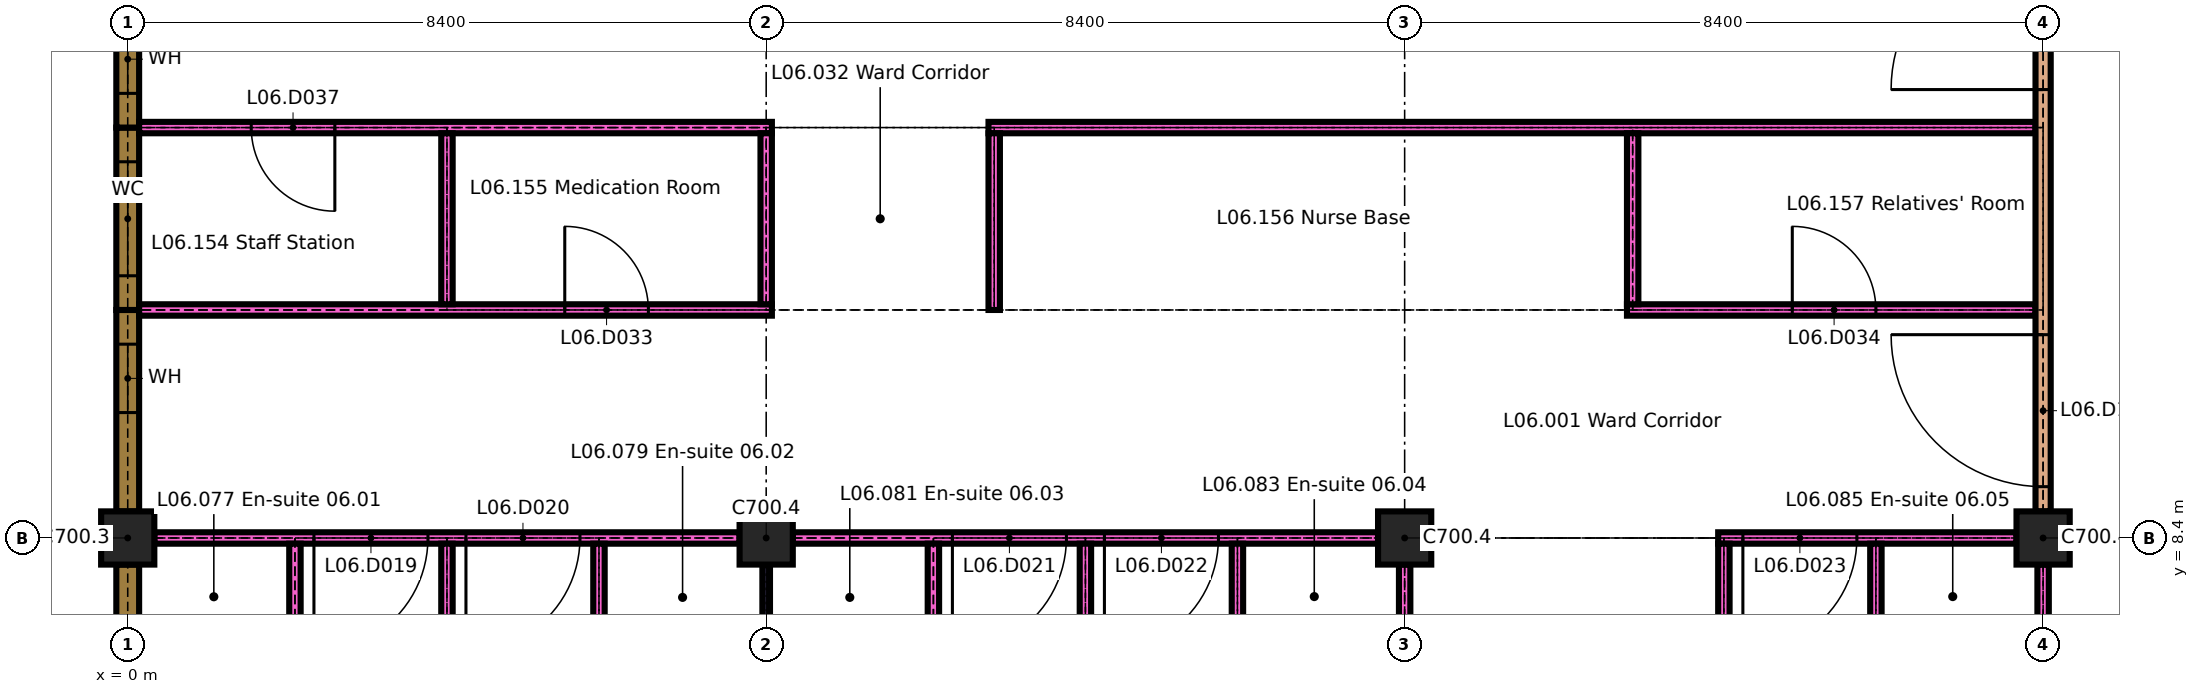
"""IFC4 building model, lengths in metres.
Left out: names, types, materials, properties, quantities, classifications, styles, units other than length and angle.
Written with IfcOpenShell. Run it as: python <this file> out.ifc"""

import sys

from ifc_helpers import new_model, si_unit, direction, frame, frame_2d, origin, origin_2d, place, context, subcontext, project, spatial, rectangle, extrude, element, fill, save


model = new_model("IFC4")
c1 = context("Model", 3, precision=1e-05, world=origin(), true_north=direction((0.0, 1.0)))
c2 = subcontext(c1, "Body", "Model", "MODEL_VIEW")
j1 = project(units=[si_unit("LENGTHUNIT", "METRE"), si_unit("PLANEANGLEUNIT", "RADIAN")], contexts=[c1])
p1 = place(None, origin())
s1 = spatial("IfcSite", under=j1, at=p1, CompositionType="ELEMENT")
p2 = place(p1, origin())
s2 = spatial("IfcBuilding", under=s1, at=p2, CompositionType="ELEMENT")
p3 = place(p2, frame((0.0, 0.0, 26.1)))
s3 = spatial("IfcBuildingStorey", under=s2, at=p3, CompositionType="ELEMENT", Elevation=26.1)
p4 = place(p3, frame((0.0, 8.4, 0.0), z_axis=(0.0, 0.0, 1.0), x_axis=(1.0, 0.0, 0.0)))
e1 = element("IfcColumn", 1, at=p4, inside=s3, PredefinedType="COLUMN", context=c2, shape_type="SweptSolid", body=[
    extrude(rectangle(XDim=0.7, YDim=0.7, at=origin_2d()), origin(), (0.0, 0.0, 1.0), 3.2),
])
for number, where, z_axis, x_axis in (
    (2, (8.4, 8.4, 0.0), (0.0, 0.0, 1.0), (1.0, 0.0, 0.0)),
    (3, (16.8, 8.4, 0.0), (0.0, 0.0, 1.0), (1.0, 0.0, 0.0)),
    (4, (25.2, 8.4, 0.0), (0.0, 0.0, 1.0), (1.0, 0.0, 0.0)),
):
    element("IfcColumn", number, at=place(p3, frame(where, z_axis=z_axis, x_axis=x_axis)), inside=s3, PredefinedType="COLUMN", context=c2, shape_type="SweptSolid", body=[
        extrude(rectangle(XDim=0.7, YDim=0.7, at=origin_2d()), origin(), (0.0, 0.0, 1.0), 3.3),
    ])
p5 = place(p3, frame((0.0, 6.0, 0.0), z_axis=(0.0, 0.0, 1.0), x_axis=(0.0, 1.0, 0.0)))
e5 = element("IfcWall", 5, at=p5, inside=s3, PredefinedType="SOLIDWALL", context=c2, shape_type="SweptSolid", body=[
    extrude(rectangle(XDim=2.05, YDim=0.3, at=frame_2d((1.025, 0.0))), origin(), (0.0, 0.0, 1.0), 2.9),
])
p6 = place(p3, frame((0.0, 8.75, 0.0), z_axis=(0.0, 0.0, 1.0), x_axis=(0.0, 1.0, 0.0)))
e6 = element("IfcWall", 6, at=p6, inside=s3, PredefinedType="SOLIDWALL", context=c2, shape_type="SweptSolid", body=[
    extrude(rectangle(XDim=2.65, YDim=0.3, at=frame_2d((1.325, 0.0))), origin(), (0.0, 0.0, 1.0), 2.9),
])
p7 = place(p6, frame((1.3, 0.0, 0.9)))
e7 = element("IfcOpeningElement", 7, at=p7, cuts=e6, PredefinedType="OPENING", context=c2, shape_type="SweptSolid", body=[
    extrude(rectangle(XDim=0.9, YDim=1.5, at=frame_2d((0.45, 0.75))), frame((0.0, 0.16, 0.0), z_axis=(0.0, -1.0, 0.0), x_axis=(1.0, 0.0, 0.0)), (0.0, 0.0, 1.0), 0.32),
])
p8 = place(p3, frame((0.0, 11.4, 0.0), z_axis=(0.0, 0.0, 1.0), x_axis=(0.0, 1.0, 0.0)))
e8 = element("IfcWall", 8, at=p8, inside=s3, PredefinedType="SOLIDWALL", context=c2, shape_type="SweptSolid", body=[
    extrude(rectangle(XDim=2.4, YDim=0.3, at=frame_2d((1.2, 0.0))), origin(), (0.0, 0.0, 1.0), 2.9),
])
p9 = place(p8, frame((0.45, 0.0, 0.9)))
e9 = element("IfcOpeningElement", 9, at=p9, cuts=e8, PredefinedType="OPENING", context=c2, shape_type="SweptSolid", body=[
    extrude(rectangle(XDim=1.5, YDim=1.5, at=frame_2d((0.75, 0.75))), frame((0.0, 0.16, 0.0), z_axis=(0.0, -1.0, 0.0), x_axis=(1.0, 0.0, 0.0)), (0.0, 0.0, 1.0), 0.32),
])
p10 = place(p3, frame((0.0, 13.8, 0.0), z_axis=(0.0, 0.0, 1.0), x_axis=(0.0, 1.0, 0.0)))
e10 = element("IfcWall", 10, at=p10, inside=s3, PredefinedType="SOLIDWALL", context=c2, shape_type="SweptSolid", body=[
    extrude(rectangle(XDim=3.0, YDim=0.3, at=frame_2d((1.5, 0.0))), origin(), (0.0, 0.0, 1.0), 2.9),
])
p11 = place(p10, frame((0.45, 0.0, 0.9)))
e11 = element("IfcOpeningElement", 11, at=p11, cuts=e10, PredefinedType="OPENING", context=c2, shape_type="SweptSolid", body=[
    extrude(rectangle(XDim=0.9, YDim=1.5, at=frame_2d((0.45, 0.75))), frame((0.0, 0.16, 0.0), z_axis=(0.0, -1.0, 0.0), x_axis=(1.0, 0.0, 0.0)), (0.0, 0.0, 1.0), 0.32),
])
p12 = place(p3, frame((0.35, 8.4, 0.0), z_axis=(0.0, 0.0, 1.0), x_axis=(1.0, 0.0, 0.0)))
e12 = element("IfcWall", 12, at=p12, inside=s3, PredefinedType="PARTITIONING", context=c2, shape_type="SweptSolid", body=[
    extrude(rectangle(XDim=7.7, YDim=0.15, at=frame_2d((3.85, 0.0))), origin(), (0.0, 0.0, 1.0), 3.3),
])
p13 = place(p12, frame((2.1, 0.0, 0.0)))
e13 = element("IfcOpeningElement", 13, at=p13, cuts=e12, PredefinedType="OPENING", context=c2, shape_type="SweptSolid", body=[
    extrude(rectangle(XDim=1.5, YDim=2.4, at=frame_2d((0.75, 1.2))), frame((0.0, 0.085, 0.0), z_axis=(0.0, -1.0, 0.0), x_axis=(1.0, 0.0, 0.0)), (0.0, 0.0, 1.0), 0.17),
])
p14 = place(p12, frame((4.1, 0.0, 0.0)))
e14 = element("IfcOpeningElement", 14, at=p14, cuts=e12, PredefinedType="OPENING", context=c2, shape_type="SweptSolid", body=[
    extrude(rectangle(XDim=1.5, YDim=2.4, at=frame_2d((0.75, 1.2))), frame((0.0, 0.085, 0.0), z_axis=(0.0, -1.0, 0.0), x_axis=(1.0, 0.0, 0.0)), (0.0, 0.0, 1.0), 0.17),
])
p15 = place(p3, frame((8.75, 8.4, 0.0), z_axis=(0.0, 0.0, 1.0), x_axis=(1.0, 0.0, 0.0)))
e15 = element("IfcWall", 15, at=p15, inside=s3, PredefinedType="PARTITIONING", context=c2, shape_type="SweptSolid", body=[
    extrude(rectangle(XDim=7.7, YDim=0.15, at=frame_2d((3.85, 0.0))), origin(), (0.0, 0.0, 1.0), 3.3),
])
p16 = place(p15, frame((2.1, 0.0, 0.0)))
e16 = element("IfcOpeningElement", 16, at=p16, cuts=e15, PredefinedType="OPENING", context=c2, shape_type="SweptSolid", body=[
    extrude(rectangle(XDim=1.5, YDim=2.4, at=frame_2d((0.75, 1.2))), frame((0.0, 0.085, 0.0), z_axis=(0.0, -1.0, 0.0), x_axis=(1.0, 0.0, 0.0)), (0.0, 0.0, 1.0), 0.17),
])
p17 = place(p15, frame((4.1, 0.0, 0.0)))
e17 = element("IfcOpeningElement", 17, at=p17, cuts=e15, PredefinedType="OPENING", context=c2, shape_type="SweptSolid", body=[
    extrude(rectangle(XDim=1.5, YDim=2.4, at=frame_2d((0.75, 1.2))), frame((0.0, 0.085, 0.0), z_axis=(0.0, -1.0, 0.0), x_axis=(1.0, 0.0, 0.0)), (0.0, 0.0, 1.0), 0.17),
])
p18 = place(p3, frame((20.925, 8.4, 0.0), z_axis=(0.0, 0.0, 1.0), x_axis=(1.0, 0.0, 0.0)))
e18 = element("IfcWall", 18, at=p18, inside=s3, PredefinedType="PARTITIONING", context=c2, shape_type="SweptSolid", body=[
    extrude(rectangle(XDim=3.925, YDim=0.15, at=frame_2d((1.962, 0.0))), origin(), (0.0, 0.0, 1.0), 3.3),
])
p19 = place(p18, frame((0.325, 0.0, 0.0)))
e19 = element("IfcOpeningElement", 19, at=p19, cuts=e18, PredefinedType="OPENING", context=c2, shape_type="SweptSolid", body=[
    extrude(rectangle(XDim=1.5, YDim=2.4, at=frame_2d((0.75, 1.2))), frame((0.0, 0.085, 0.0), z_axis=(0.0, -1.0, 0.0), x_axis=(1.0, 0.0, 0.0)), (0.0, 0.0, 1.0), 0.17),
])
p20 = place(p3, frame((0.15, 11.4, 0.0), z_axis=(0.0, 0.0, 1.0), x_axis=(1.0, 0.0, 0.0)))
e20 = element("IfcWall", 20, at=p20, inside=s3, PredefinedType="PARTITIONING", context=c2, shape_type="SweptSolid", body=[
    extrude(rectangle(XDim=8.325, YDim=0.15, at=frame_2d((4.163, 0.0))), origin(), (0.0, 0.0, 1.0), 3.3),
])
p21 = place(p20, frame((5.6, 0.0, 0.0)))
e21 = element("IfcOpeningElement", 21, at=p21, cuts=e20, PredefinedType="OPENING", context=c2, shape_type="SweptSolid", body=[
    extrude(rectangle(XDim=1.1, YDim=2.1, at=frame_2d((0.55, 1.05))), frame((0.0, 0.085, 0.0), z_axis=(0.0, -1.0, 0.0), x_axis=(1.0, 0.0, 0.0)), (0.0, 0.0, 1.0), 0.17),
])
p22 = place(p3, frame((19.725, 11.4, 0.0), z_axis=(0.0, 0.0, 1.0), x_axis=(1.0, 0.0, 0.0)))
e22 = element("IfcWall", 22, at=p22, inside=s3, PredefinedType="PARTITIONING", context=c2, shape_type="SweptSolid", body=[
    extrude(rectangle(XDim=5.375, YDim=0.15, at=frame_2d((2.688, 0.0))), origin(), (0.0, 0.0, 1.0), 3.3),
])
p23 = place(p22, frame((2.175, 0.0, 0.0)))
e23 = element("IfcOpeningElement", 23, at=p23, cuts=e22, PredefinedType="OPENING", context=c2, shape_type="SweptSolid", body=[
    extrude(rectangle(XDim=1.1, YDim=2.1, at=frame_2d((0.55, 1.05))), frame((0.0, 0.085, 0.0), z_axis=(0.0, -1.0, 0.0), x_axis=(1.0, 0.0, 0.0)), (0.0, 0.0, 1.0), 0.17),
])
p24 = place(p3, frame((0.15, 13.8, 0.0), z_axis=(0.0, 0.0, 1.0), x_axis=(1.0, 0.0, 0.0)))
e24 = element("IfcWall", 24, at=p24, inside=s3, PredefinedType="PARTITIONING", context=c2, shape_type="SweptSolid", body=[
    extrude(rectangle(XDim=8.325, YDim=0.15, at=frame_2d((4.163, 0.0))), origin(), (0.0, 0.0, 1.0), 3.3),
])
p25 = place(p24, frame((1.475, 0.0, 0.0)))
e25 = element("IfcOpeningElement", 25, at=p25, cuts=e24, PredefinedType="OPENING", context=c2, shape_type="SweptSolid", body=[
    extrude(rectangle(XDim=1.1, YDim=2.1, at=frame_2d((0.55, 1.05))), frame((0.0, 0.085, 0.0), z_axis=(0.0, -1.0, 0.0), x_axis=(1.0, 0.0, 0.0)), (0.0, 0.0, 1.0), 0.17),
])
p26 = place(p3, frame((11.325, 13.8, 0.0), z_axis=(0.0, 0.0, 1.0), x_axis=(1.0, 0.0, 0.0)))
e26 = element("IfcWall", 26, at=p26, inside=s3, PredefinedType="PARTITIONING", context=c2, shape_type="SweptSolid", body=[
    extrude(rectangle(XDim=13.775, YDim=0.15, at=frame_2d((6.888, 0.0))), origin(), (0.0, 0.0, 1.0), 3.3),
])
p27 = place(p3, frame((2.2, 6.075, 0.0), z_axis=(0.0, 0.0, 1.0), x_axis=(0.0, 1.0, 0.0)))
e27 = element("IfcWall", 27, at=p27, inside=s3, PredefinedType="PARTITIONING", context=c2, shape_type="SweptSolid", body=[
    extrude(rectangle(XDim=2.25, YDim=0.15, at=frame_2d((1.125, 0.0))), origin(), (0.0, 0.0, 1.0), 3.3),
])
p28 = place(p3, frame((4.2, 0.15, 0.0), z_axis=(0.0, 0.0, 1.0), x_axis=(0.0, 1.0, 0.0)))
e28 = element("IfcWall", 28, at=p28, inside=s3, PredefinedType="PARTITIONING", context=c2, shape_type="SweptSolid", body=[
    extrude(rectangle(XDim=8.175, YDim=0.15, at=frame_2d((4.087, 0.0))), origin(), (0.0, 0.0, 1.0), 3.3),
])
for number, where, z_axis, x_axis in (
    (29, (4.2, 11.475, 0.0), (0.0, 0.0, 1.0), (0.0, 1.0, 0.0)),
    (30, (6.2, 6.075, 0.0), (0.0, 0.0, 1.0), (0.0, 1.0, 0.0)),
):
    element("IfcWall", number, at=place(p3, frame(where, z_axis=z_axis, x_axis=x_axis)), inside=s3, PredefinedType="PARTITIONING", context=c2, shape_type="SweptSolid", body=[
        extrude(rectangle(XDim=2.25, YDim=0.15, at=frame_2d((1.125, 0.0))), origin(), (0.0, 0.0, 1.0), 3.3),
    ])
p29 = place(p3, frame((8.4, 6.075, 0.0), z_axis=(0.0, 0.0, 1.0), x_axis=(0.0, 1.0, 0.0)))
e31 = element("IfcWall", 31, at=p29, inside=s3, PredefinedType="PARTITIONING", context=c2, shape_type="SweptSolid", body=[
    extrude(rectangle(XDim=1.975, YDim=0.1, at=frame_2d((0.988, 0.0))), origin(), (0.0, 0.0, 1.0), 3.3),
])
for number, where, z_axis, x_axis in (
    (32, (8.4, 11.475, 0.0), (0.0, 0.0, 1.0), (0.0, 1.0, 0.0)),
    (33, (10.6, 6.075, 0.0), (0.0, 0.0, 1.0), (0.0, 1.0, 0.0)),
):
    element("IfcWall", number, at=place(p3, frame(where, z_axis=z_axis, x_axis=x_axis)), inside=s3, PredefinedType="PARTITIONING", context=c2, shape_type="SweptSolid", body=[
        extrude(rectangle(XDim=2.25, YDim=0.15, at=frame_2d((1.125, 0.0))), origin(), (0.0, 0.0, 1.0), 3.3),
    ])
p30 = place(p3, frame((11.4, 11.4, 0.0), z_axis=(0.0, 0.0, 1.0), x_axis=(0.0, 1.0, 0.0)))
e34 = element("IfcWall", 34, at=p30, inside=s3, PredefinedType="PARTITIONING", context=c2, shape_type="SweptSolid", body=[
    extrude(rectangle(XDim=2.325, YDim=0.15, at=frame_2d((1.163, 0.0))), origin(), (0.0, 0.0, 1.0), 3.3),
])
p31 = place(p3, frame((12.6, 0.15, 0.0), z_axis=(0.0, 0.0, 1.0), x_axis=(0.0, 1.0, 0.0)))
e35 = element("IfcWall", 35, at=p31, inside=s3, PredefinedType="PARTITIONING", context=c2, shape_type="SweptSolid", body=[
    extrude(rectangle(XDim=8.175, YDim=0.15, at=frame_2d((4.087, 0.0))), origin(), (0.0, 0.0, 1.0), 3.3),
])
p32 = place(p3, frame((14.6, 6.075, 0.0), z_axis=(0.0, 0.0, 1.0), x_axis=(0.0, 1.0, 0.0)))
e36 = element("IfcWall", 36, at=p32, inside=s3, PredefinedType="PARTITIONING", context=c2, shape_type="SweptSolid", body=[
    extrude(rectangle(XDim=2.25, YDim=0.15, at=frame_2d((1.125, 0.0))), origin(), (0.0, 0.0, 1.0), 3.3),
])
p33 = place(p3, frame((16.8, 0.35, 0.0), z_axis=(0.0, 0.0, 1.0), x_axis=(0.0, 1.0, 0.0)))
e37 = element("IfcWall", 37, at=p33, inside=s3, PredefinedType="PARTITIONING", context=c2, shape_type="SweptSolid", body=[
    extrude(rectangle(XDim=7.7, YDim=0.15, at=frame_2d((3.85, 0.0))), origin(), (0.0, 0.0, 1.0), 3.3),
])
p34 = place(p3, frame((19.8, 11.475, 0.0), z_axis=(0.0, 0.0, 1.0), x_axis=(0.0, 1.0, 0.0)))
e38 = element("IfcWall", 38, at=p34, inside=s3, PredefinedType="PARTITIONING", context=c2, shape_type="SweptSolid", body=[
    extrude(rectangle(XDim=2.25, YDim=0.15, at=frame_2d((1.125, 0.0))), origin(), (0.0, 0.0, 1.0), 3.3),
])
p35 = place(p3, frame((21.0, 0.15, 0.0), z_axis=(0.0, 0.0, 1.0), x_axis=(0.0, 1.0, 0.0)))
e39 = element("IfcWall", 39, at=p35, inside=s3, PredefinedType="PARTITIONING", context=c2, shape_type="SweptSolid", body=[
    extrude(rectangle(XDim=8.175, YDim=0.15, at=frame_2d((4.087, 0.0))), origin(), (0.0, 0.0, 1.0), 3.3),
])
p36 = place(p3, frame((23.0, 6.075, 0.0), z_axis=(0.0, 0.0, 1.0), x_axis=(0.0, 1.0, 0.0)))
e40 = element("IfcWall", 40, at=p36, inside=s3, PredefinedType="PARTITIONING", context=c2, shape_type="SweptSolid", body=[
    extrude(rectangle(XDim=2.25, YDim=0.15, at=frame_2d((1.125, 0.0))), origin(), (0.0, 0.0, 1.0), 3.3),
])
p37 = place(p3, frame((25.2, 0.35, 0.0), z_axis=(0.0, 0.0, 1.0), x_axis=(0.0, 1.0, 0.0)))
e41 = element("IfcWall", 41, at=p37, inside=s3, PredefinedType="PARTITIONING", context=c2, shape_type="SweptSolid", body=[
    extrude(rectangle(XDim=7.7, YDim=0.15, at=frame_2d((3.85, 0.0))), origin(), (0.0, 0.0, 1.0), 3.3),
])
p38 = place(p3, frame((25.2, 8.75, 0.0), z_axis=(0.0, 0.0, 1.0), x_axis=(0.0, 1.0, 0.0)))
e42 = element("IfcWall", 42, at=p38, inside=s3, PredefinedType="PARTITIONING", context=c2, shape_type="SweptSolid", body=[
    extrude(rectangle(XDim=12.85, YDim=0.2, at=frame_2d((6.425, 0.0))), origin(), (0.0, 0.0, 1.0), 3.3),
])
p39 = place(p38, frame((0.325, 0.0, 0.0)))
e43 = element("IfcOpeningElement", 43, at=p39, cuts=e42, PredefinedType="OPENING", context=c2, shape_type="SweptSolid", body=[
    extrude(rectangle(XDim=2.0, YDim=2.4, at=frame_2d((1.0, 1.2))), frame((0.0, 0.11, 0.0), z_axis=(0.0, -1.0, 0.0), x_axis=(1.0, 0.0, 0.0)), (0.0, 0.0, 1.0), 0.22),
])
p40 = place(p38, frame((5.55, 0.0, 0.0)))
e44 = element("IfcOpeningElement", 44, at=p40, cuts=e42, PredefinedType="OPENING", context=c2, shape_type="SweptSolid", body=[
    extrude(rectangle(XDim=2.0, YDim=2.4, at=frame_2d((1.0, 1.2))), frame((0.0, 0.11, 0.0), z_axis=(0.0, -1.0, 0.0), x_axis=(1.0, 0.0, 0.0)), (0.0, 0.0, 1.0), 0.22),
])
p41 = place(p7, origin())
e45 = element("IfcWindow", 45, at=p41, inside=s3, PartitioningType="SINGLE_PANEL", PredefinedType="WINDOW", context=c2, shape_type="SweptSolid", body=[
    extrude(rectangle(XDim=0.9, YDim=1.5, at=frame_2d((0.45, 0.75))), frame((0.0, 0.03, 0.0), z_axis=(0.0, -1.0, 0.0), x_axis=(1.0, 0.0, 0.0)), (0.0, 0.0, 1.0), 0.06),
])
fill(e7, e45)
p42 = place(p9, origin())
e46 = element("IfcWindow", 46, at=p42, inside=s3, PartitioningType="SINGLE_PANEL", PredefinedType="WINDOW", context=c2, shape_type="SweptSolid", body=[
    extrude(rectangle(XDim=1.5, YDim=1.5, at=frame_2d((0.75, 0.75))), frame((0.0, 0.03, 0.0), z_axis=(0.0, -1.0, 0.0), x_axis=(1.0, 0.0, 0.0)), (0.0, 0.0, 1.0), 0.06),
])
fill(e9, e46)
p43 = place(p11, origin())
e47 = element("IfcWindow", 47, at=p43, inside=s3, PartitioningType="SINGLE_PANEL", PredefinedType="WINDOW", context=c2, shape_type="SweptSolid", body=[
    extrude(rectangle(XDim=0.9, YDim=1.5, at=frame_2d((0.45, 0.75))), frame((0.0, 0.03, 0.0), z_axis=(0.0, -1.0, 0.0), x_axis=(1.0, 0.0, 0.0)), (0.0, 0.0, 1.0), 0.06),
])
fill(e11, e47)
p44 = place(p13, origin())
e48 = element("IfcDoor", 48, at=p44, inside=s3, OperationType="SINGLE_SWING_LEFT", PredefinedType="DOOR", context=c2, shape_type="SweptSolid", body=[
    extrude(rectangle(XDim=1.5, YDim=2.4, at=frame_2d((0.75, 1.2))), frame((0.0, 0.03, 0.0), z_axis=(0.0, -1.0, 0.0), x_axis=(1.0, 0.0, 0.0)), (0.0, 0.0, 1.0), 0.06),
])
fill(e13, e48)
p45 = place(p14, origin())
e49 = element("IfcDoor", 49, at=p45, inside=s3, OperationType="SINGLE_SWING_LEFT", PredefinedType="DOOR", context=c2, shape_type="SweptSolid", body=[
    extrude(rectangle(XDim=1.5, YDim=2.4, at=frame_2d((0.75, 1.2))), frame((0.0, 0.03, 0.0), z_axis=(0.0, -1.0, 0.0), x_axis=(1.0, 0.0, 0.0)), (0.0, 0.0, 1.0), 0.06),
])
fill(e14, e49)
p46 = place(p16, origin())
e50 = element("IfcDoor", 50, at=p46, inside=s3, OperationType="SINGLE_SWING_LEFT", PredefinedType="DOOR", context=c2, shape_type="SweptSolid", body=[
    extrude(rectangle(XDim=1.5, YDim=2.4, at=frame_2d((0.75, 1.2))), frame((0.0, 0.03, 0.0), z_axis=(0.0, -1.0, 0.0), x_axis=(1.0, 0.0, 0.0)), (0.0, 0.0, 1.0), 0.06),
])
fill(e16, e50)
p47 = place(p17, origin())
e51 = element("IfcDoor", 51, at=p47, inside=s3, OperationType="SINGLE_SWING_LEFT", PredefinedType="DOOR", context=c2, shape_type="SweptSolid", body=[
    extrude(rectangle(XDim=1.5, YDim=2.4, at=frame_2d((0.75, 1.2))), frame((0.0, 0.03, 0.0), z_axis=(0.0, -1.0, 0.0), x_axis=(1.0, 0.0, 0.0)), (0.0, 0.0, 1.0), 0.06),
])
fill(e17, e51)
p48 = place(p19, origin())
e52 = element("IfcDoor", 52, at=p48, inside=s3, OperationType="SINGLE_SWING_LEFT", PredefinedType="DOOR", context=c2, shape_type="SweptSolid", body=[
    extrude(rectangle(XDim=1.5, YDim=2.4, at=frame_2d((0.75, 1.2))), frame((0.0, 0.03, 0.0), z_axis=(0.0, -1.0, 0.0), x_axis=(1.0, 0.0, 0.0)), (0.0, 0.0, 1.0), 0.06),
])
fill(e19, e52)
p49 = place(p21, origin())
e53 = element("IfcDoor", 53, at=p49, inside=s3, OperationType="SINGLE_SWING_RIGHT", PredefinedType="DOOR", context=c2, shape_type="SweptSolid", body=[
    extrude(rectangle(XDim=1.1, YDim=2.1, at=frame_2d((0.55, 1.05))), frame((0.0, 0.025, 0.0), z_axis=(0.0, -1.0, 0.0), x_axis=(1.0, 0.0, 0.0)), (0.0, 0.0, 1.0), 0.05),
])
fill(e21, e53)
p50 = place(p23, origin())
e54 = element("IfcDoor", 54, at=p50, inside=s3, OperationType="SINGLE_SWING_RIGHT", PredefinedType="DOOR", context=c2, shape_type="SweptSolid", body=[
    extrude(rectangle(XDim=1.1, YDim=2.1, at=frame_2d((0.55, 1.05))), frame((0.0, 0.025, 0.0), z_axis=(0.0, -1.0, 0.0), x_axis=(1.0, 0.0, 0.0)), (0.0, 0.0, 1.0), 0.05),
])
fill(e23, e54)
p51 = place(p25, origin())
e55 = element("IfcDoor", 55, at=p51, inside=s3, OperationType="SINGLE_SWING_RIGHT", PredefinedType="DOOR", context=c2, shape_type="SweptSolid", body=[
    extrude(rectangle(XDim=1.1, YDim=2.1, at=frame_2d((0.55, 1.05))), frame((0.0, 0.025, 0.0), z_axis=(0.0, -1.0, 0.0), x_axis=(1.0, 0.0, 0.0)), (0.0, 0.0, 1.0), 0.05),
])
fill(e25, e55)
p52 = place(p39, origin())
e56 = element("IfcDoor", 56, at=p52, inside=s3, OperationType="SINGLE_SWING_LEFT", PredefinedType="DOOR", context=c2, shape_type="SweptSolid", body=[
    extrude(rectangle(XDim=2.0, YDim=2.4, at=frame_2d((1.0, 1.2))), frame((0.0, 0.03, 0.0), z_axis=(0.0, -1.0, 0.0), x_axis=(1.0, 0.0, 0.0)), (0.0, 0.0, 1.0), 0.06),
])
fill(e43, e56)
p53 = place(p40, origin())
e57 = element("IfcDoor", 57, at=p53, inside=s3, OperationType="SINGLE_SWING_RIGHT", PredefinedType="DOOR", context=c2, shape_type="SweptSolid", body=[
    extrude(rectangle(XDim=2.0, YDim=2.4, at=frame_2d((1.0, 1.2))), frame((0.0, 0.03, 0.0), z_axis=(0.0, -1.0, 0.0), x_axis=(1.0, 0.0, 0.0)), (0.0, 0.0, 1.0), 0.06),
])
fill(e44, e57)
save(model, sys.argv[1])
